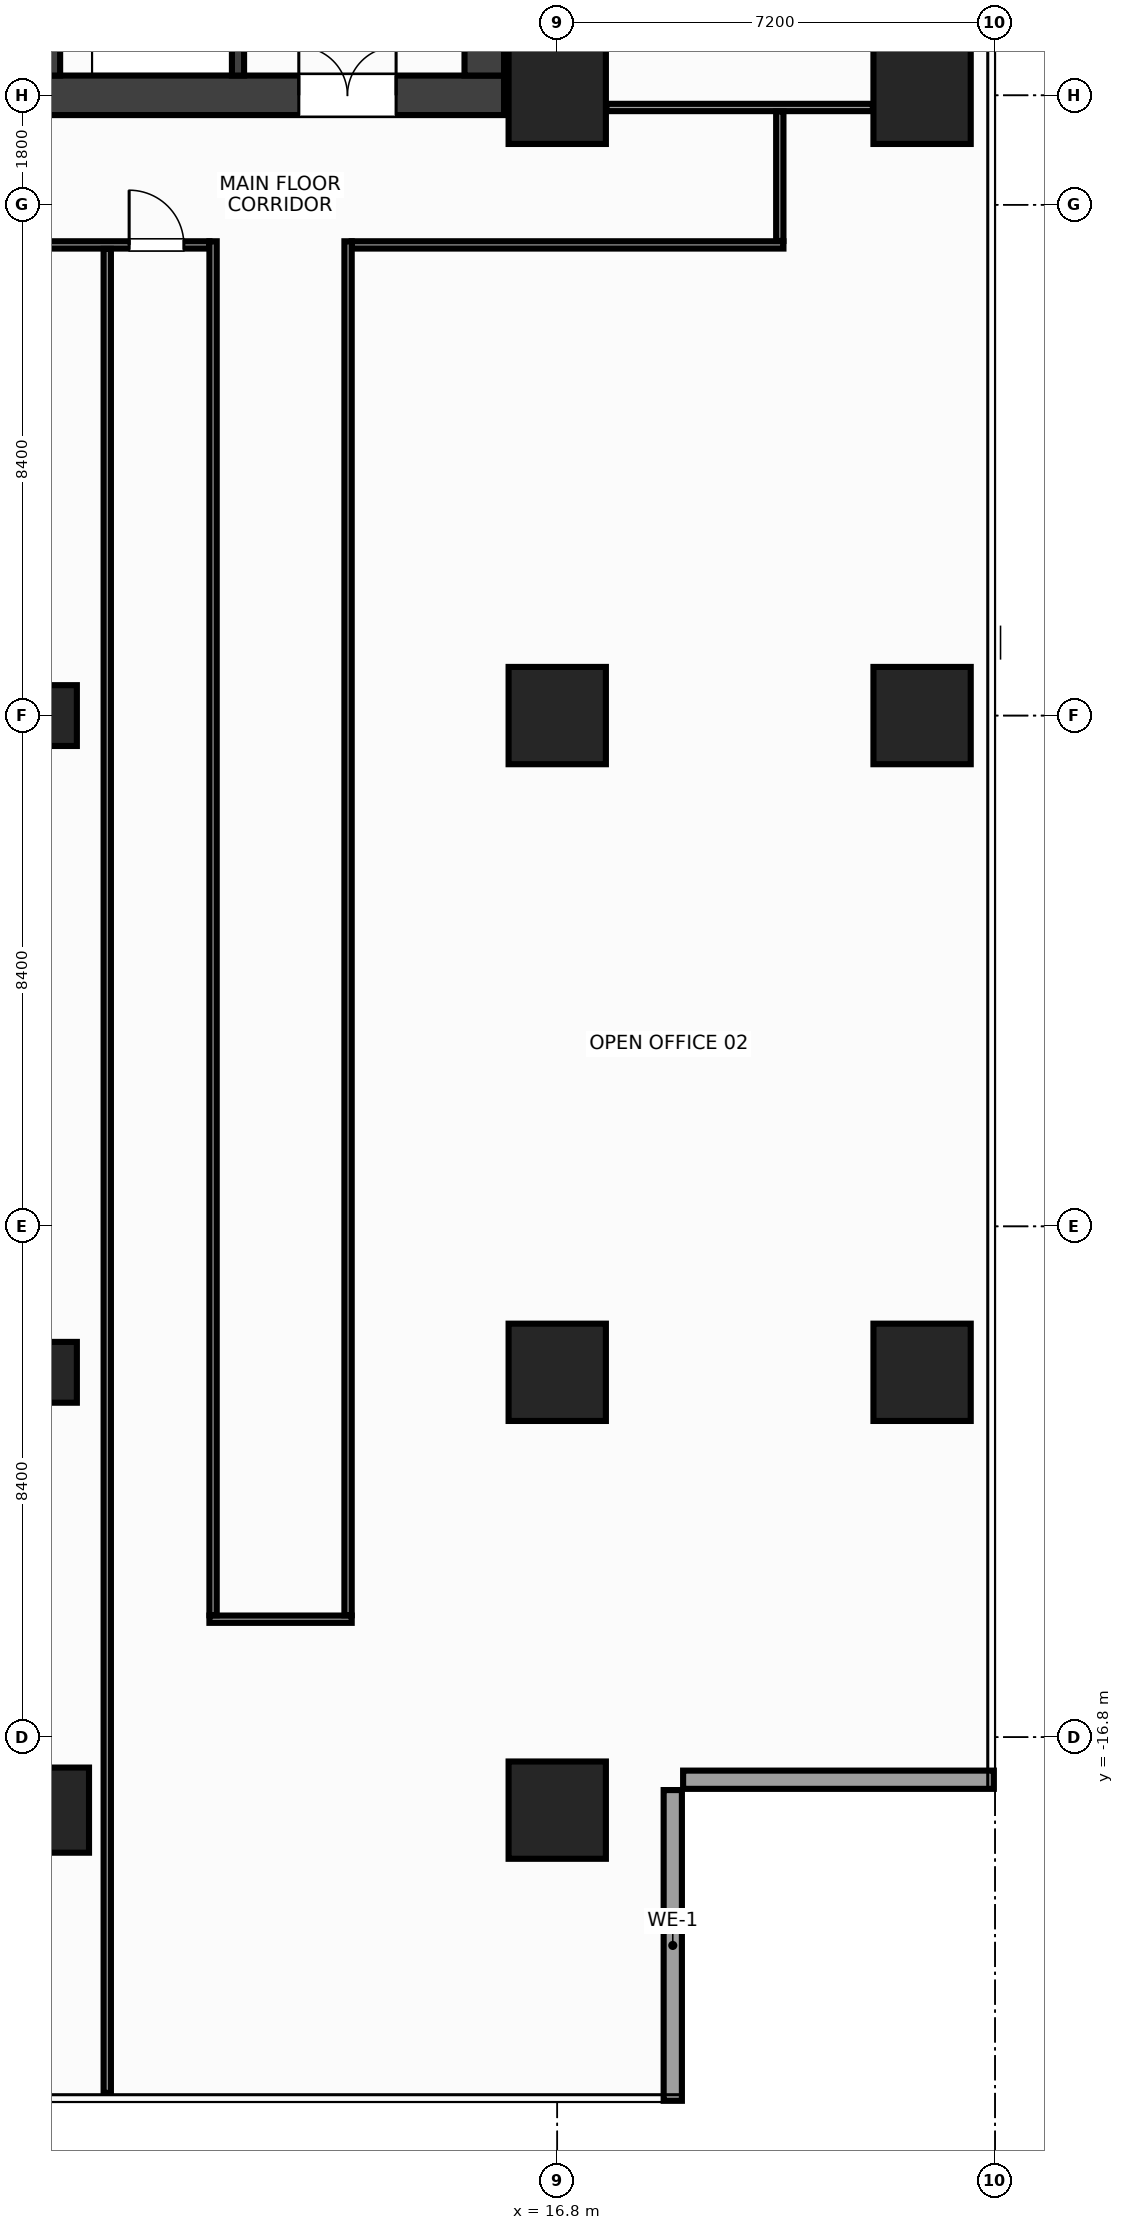
"""IFC4 building model, lengths in metres.
Left out: names, types, materials, properties, quantities, classifications, styles, units other than length and angle.
Written with IfcOpenShell. Run it as: python <this file> out.ifc"""

import sys

from ifc_helpers import new_model, si_unit, direction, frame, frame_2d, origin, origin_2d, place, context, subcontext, project, spatial, rectangle, hollow_rectangle, extrude, source, transform, mapped, element, fill, save


model = new_model("IFC4")
c1 = context("Model", 3, precision=1e-05, world=origin(), true_north=direction((0.0, 1.0)))
c2 = subcontext(c1, "Body", "Model", "MODEL_VIEW")
j1 = project(units=[si_unit("LENGTHUNIT", "METRE"), si_unit("PLANEANGLEUNIT", "RADIAN")], contexts=[c1])
p1 = place(None, origin())
s1 = spatial("IfcSite", under=j1, at=p1, CompositionType="ELEMENT")
p2 = place(p1, origin())
s2 = spatial("IfcBuilding", under=s1, at=p2, CompositionType="ELEMENT")
p3 = place(p2, frame((0.0, 0.0, 142.4)))
s3 = spatial("IfcBuildingStorey", under=s2, at=p3, CompositionType="ELEMENT", Elevation=142.4)
m1 = source(origin(), c2, "Body", "SweptSolid", [
    extrude(rectangle(XDim=31.85, YDim=0.65, at=frame_2d((15.925, 0.0))), origin(), (0.0, 0.0, 1.0), 3.6),
])
p4 = place(p3, frame((-15.925, 10.2, 0.0), z_axis=(0.0, 0.0, 1.0), x_axis=(1.0, 0.0, 0.0)))
e1 = element("IfcWall", 1, at=p4, inside=s3, PredefinedType="SHEAR", context=c2, shape_type="MappedRepresentation", body=[
    mapped(m1, transform((0.0, 0.0, 0.0), x_axis=(1.0, 0.0, 0.0), y_axis=(0.0, 1.0, 0.0), z_axis=(0.0, 0.0, 1.0), scale=1.0)),
])
p5 = place(p4, frame((1.775, 0.0, 0.0)))
e2 = element("IfcOpeningElement", 2, at=p5, cuts=e1, PredefinedType="OPENING", context=c2, shape_type="SweptSolid", body=[
    extrude(rectangle(XDim=1.6, YDim=2.15, at=frame_2d((0.8, 1.075))), frame((0.0, 0.337, 0.0), z_axis=(0.0, -1.0, 0.0), x_axis=(1.0, 0.0, 0.0)), (0.0, 0.0, 1.0), 0.674),
])
p6 = place(p4, frame((28.475, 0.0, 0.0)))
e3 = element("IfcOpeningElement", 3, at=p6, cuts=e1, PredefinedType="OPENING", context=c2, shape_type="SweptSolid", body=[
    extrude(rectangle(XDim=1.6, YDim=2.15, at=frame_2d((0.8, 1.075))), frame((0.0, 0.337, 0.0), z_axis=(0.0, -1.0, 0.0), x_axis=(1.0, 0.0, 0.0)), (0.0, 0.0, 1.0), 0.674),
])
p7 = place(p4, frame((15.175, 0.0, 0.0)))
e4 = element("IfcOpeningElement", 4, at=p7, cuts=e1, PredefinedType="OPENING", context=c2, shape_type="SweptSolid", body=[
    extrude(rectangle(XDim=1.5, YDim=2.2, at=frame_2d((0.75, 1.1))), frame((0.0, 0.337, 0.0), z_axis=(0.0, -1.0, 0.0), x_axis=(1.0, 0.0, 0.0)), (0.0, 0.0, 1.0), 0.674),
])
m2 = source(origin(), c2, "Body", "SweptSolid", [
    extrude(rectangle(XDim=12.95, YDim=0.65, at=frame_2d((6.475, 0.0))), origin(), (0.0, 0.0, 1.0), 3.6),
])
p8 = place(p3, frame((15.6, 10.525, 0.0), z_axis=(0.0, 0.0, 1.0), x_axis=(0.0, 1.0, 0.0)))
e5 = element("IfcWall", 5, at=p8, inside=s3, PredefinedType="SHEAR", context=c2, shape_type="MappedRepresentation", body=[
    mapped(m2, transform((0.0, 0.0, 0.0), x_axis=(1.0, 0.0, 0.0), y_axis=(0.0, 1.0, 0.0), z_axis=(0.0, 0.0, 1.0), scale=1.0)),
])
m3 = source(origin(), c2, "Body", "SweptSolid", [
    extrude(rectangle(XDim=12.95, YDim=0.25, at=frame_2d((6.475, 0.0))), origin(), (0.0, 0.0, 1.0), 3.6),
])
p9 = place(p3, frame((8.5, 10.525, 0.0), z_axis=(0.0, 0.0, 1.0), x_axis=(0.0, 1.0, 0.0)))
e6 = element("IfcWall", 6, at=p9, inside=s3, PredefinedType="SHEAR", context=c2, shape_type="MappedRepresentation", body=[
    mapped(m3, transform((0.0, 0.0, 0.0), x_axis=(1.0, 0.0, 0.0), y_axis=(0.0, 1.0, 0.0), z_axis=(0.0, 0.0, 1.0), scale=1.0)),
])
p10 = place(p9, frame((9.925, 0.0, 0.0)))
e7 = element("IfcOpeningElement", 7, at=p10, cuts=e6, PredefinedType="OPENING", context=c2, shape_type="SweptSolid", body=[
    extrude(rectangle(XDim=0.95, YDim=2.15, at=frame_2d((0.475, 1.075))), frame((0.0, 0.137, 0.0), z_axis=(0.0, -1.0, 0.0), x_axis=(1.0, 0.0, 0.0)), (0.0, 0.0, 1.0), 0.274),
])
m4 = source(origin(), c2, "Body", "SweptSolid", [
    extrude(rectangle(XDim=3.125, YDim=0.2, at=frame_2d((1.562, 0.0))), origin(), (0.0, 0.0, 1.0), 3.6),
])
p11 = place(p3, frame((11.55, 10.525, 0.0), z_axis=(0.0, 0.0, 1.0), x_axis=(0.0, 1.0, 0.0)))
e8 = element("IfcWall", 8, at=p11, inside=s3, PredefinedType="SHEAR", context=c2, shape_type="MappedRepresentation", body=[
    mapped(m4, transform((0.0, 0.0, 0.0), x_axis=(1.0, 0.0, 0.0), y_axis=(0.0, 1.0, 0.0), z_axis=(0.0, 0.0, 1.0), scale=1.0)),
])
p12 = place(p11, frame((0.9, 0.0, 0.0)))
e9 = element("IfcOpeningElement", 9, at=p12, cuts=e8, PredefinedType="OPENING", context=c2, shape_type="SweptSolid", body=[
    extrude(rectangle(XDim=1.1, YDim=2.15, at=frame_2d((0.55, 1.075))), frame((0.0, 0.112, 0.0), z_axis=(0.0, -1.0, 0.0), x_axis=(1.0, 0.0, 0.0)), (0.0, 0.0, 1.0), 0.224),
])
m5 = source(origin(), c2, "Body", "SweptSolid", [
    extrude(rectangle(XDim=1.6, YDim=1.6, at=origin_2d()), origin(), (0.0, 0.0, 1.0), 3.6),
])
for number, where, z_axis, x_axis in (
    (10, (16.8, -18.0, 0.0), (0.0, 0.0, 1.0), (1.0, 0.0, 0.0)),
    (11, (16.8, -10.8, 0.0), (0.0, 0.0, 1.0), (1.0, 0.0, 0.0)),
    (12, (16.8, 0.0, 0.0), (0.0, 0.0, 1.0), (1.0, 0.0, 0.0)),
    (13, (16.8, 10.2, 0.0), (0.0, 0.0, 1.0), (1.0, 0.0, 0.0)),
    (14, (22.8, -10.8, 0.0), (0.0, 0.0, 1.0), (1.0, 0.0, 0.0)),
    (15, (22.8, 0.0, 0.0), (0.0, 0.0, 1.0), (1.0, 0.0, 0.0)),
    (16, (22.8, 10.2, 0.0), (0.0, 0.0, 1.0), (1.0, 0.0, 0.0)),
):
    element("IfcColumn", number, at=place(p3, frame(where, z_axis=z_axis, x_axis=x_axis)), inside=s3, PredefinedType="COLUMN", context=c2, shape_type="MappedRepresentation", body=[
        mapped(m5, transform((0.0, 0.0, 0.0), x_axis=(1.0, 0.0, 0.0), y_axis=(0.0, 1.0, 0.0), z_axis=(0.0, 0.0, 1.0), scale=1.0)),
    ])
m6 = source(origin(), c2, "Body", "SweptSolid", [
    extrude(rectangle(XDim=1.4, YDim=1.4, at=origin_2d()), origin(), (0.0, 0.0, 1.0), 3.6),
])
p13 = place(p3, frame((8.4, -18.0, 0.0), z_axis=(0.0, 0.0, 1.0), x_axis=(1.0, 0.0, 0.0)))
e17 = element("IfcColumn", 17, at=p13, inside=s3, PredefinedType="COLUMN", context=c2, shape_type="MappedRepresentation", body=[
    mapped(m6, transform((0.0, 0.0, 0.0), x_axis=(1.0, 0.0, 0.0), y_axis=(0.0, 1.0, 0.0), z_axis=(0.0, 0.0, 1.0), scale=1.0)),
])
m7 = source(origin(), c2, "Body", "SweptSolid", [
    extrude(hollow_rectangle(XDim=1.0, YDim=1.0, WallThickness=0.045, at=origin_2d()), origin(), (0.0, 0.0, 1.0), 3.6),
])
for number, where, z_axis, x_axis in (
    (18, (8.4, 0.0, 0.0), (0.0, 0.0, 1.0), (1.0, 0.0, 0.0)),
    (19, (8.4, -10.8, 0.0), (0.0, 0.0, 1.0), (1.0, 0.0, 0.0)),
):
    element("IfcColumn", number, at=place(p3, frame(where, z_axis=z_axis, x_axis=x_axis)), inside=s3, PredefinedType="COLUMN", context=c2, shape_type="MappedRepresentation", body=[
        mapped(m7, transform((0.0, 0.0, 0.0), x_axis=(1.0, 0.0, 0.0), y_axis=(0.0, 1.0, 0.0), z_axis=(0.0, 0.0, 1.0), scale=1.0)),
    ])
m8 = source(origin(), c2, "Body", "SweptSolid", [
    extrude(rectangle(XDim=5.11, YDim=0.3, at=frame_2d((2.555, 0.0))), origin(), (0.0, 0.0, 1.0), 2.76),
])
p14 = place(p3, frame((18.7, -22.78, 0.0), z_axis=(0.0, 0.0, 1.0), x_axis=(0.0, 1.0, 0.0)))
e20 = element("IfcWall", 20, at=p14, inside=s3, PredefinedType="STANDARD", context=c2, shape_type="MappedRepresentation", body=[
    mapped(m8, transform((0.0, 0.0, 0.0), x_axis=(1.0, 0.0, 0.0), y_axis=(0.0, 1.0, 0.0), z_axis=(0.0, 0.0, 1.0), scale=1.0)),
])
m9 = source(origin(), c2, "Body", "SweptSolid", [
    extrude(rectangle(XDim=5.11, YDim=0.3, at=frame_2d((2.555, 0.0))), origin(), (0.0, 0.0, 1.0), 2.76),
])
p15 = place(p3, frame((18.87, -17.5, 0.0), z_axis=(0.0, 0.0, 1.0), x_axis=(1.0, 0.0, 0.0)))
e21 = element("IfcWall", 21, at=p15, inside=s3, PredefinedType="STANDARD", context=c2, shape_type="MappedRepresentation", body=[
    mapped(m9, transform((0.0, 0.0, 0.0), x_axis=(1.0, 0.0, 0.0), y_axis=(0.0, 1.0, 0.0), z_axis=(0.0, 0.0, 1.0), scale=1.0)),
])
m10 = source(origin(), c2, "Body", "SweptSolid", [
    extrude(rectangle(XDim=4.38, YDim=0.12, at=frame_2d((2.19, 0.0))), origin(), (0.0, 0.0, 1.0), 2.915),
])
p16 = place(p3, frame((17.61, 10.0, 0.0), z_axis=(0.0, 0.0, 1.0), x_axis=(1.0, 0.0, 0.0)))
e22 = element("IfcWall", 22, at=p16, inside=s3, PredefinedType="PARTITIONING", context=c2, shape_type="MappedRepresentation", body=[
    mapped(m10, transform((0.0, 0.0, 0.0), x_axis=(1.0, 0.0, 0.0), y_axis=(0.0, 1.0, 0.0), z_axis=(0.0, 0.0, 1.0), scale=1.0)),
])
m11 = source(origin(), c2, "Body", "SweptSolid", [
    extrude(rectangle(XDim=31.6, YDim=0.12, at=frame_2d((15.8, 0.0))), origin(), (0.0, 0.0, 1.0), 2.765),
])
p17 = place(p3, frame((-20.52, 7.74, 0.0), z_axis=(0.0, 0.0, 1.0), x_axis=(1.0, 0.0, 0.0)))
e23 = element("IfcWall", 23, at=p17, inside=s3, PredefinedType="PARTITIONING", context=c2, shape_type="MappedRepresentation", body=[
    mapped(m11, transform((0.0, 0.0, 0.0), x_axis=(1.0, 0.0, 0.0), y_axis=(0.0, 1.0, 0.0), z_axis=(0.0, 0.0, 1.0), scale=1.0)),
])
p18 = place(p17, frame((1.74, 0.0, 0.0)))
e24 = element("IfcOpeningElement", 24, at=p18, cuts=e23, PredefinedType="OPENING", context=c2, shape_type="SweptSolid", body=[
    extrude(rectangle(XDim=0.9, YDim=2.15, at=frame_2d((0.45, 1.075))), frame((0.0, 0.072, 0.0), z_axis=(0.0, -1.0, 0.0), x_axis=(1.0, 0.0, 0.0)), (0.0, 0.0, 1.0), 0.144),
])
p19 = place(p17, frame((30.28, 0.0, 0.0)))
e25 = element("IfcOpeningElement", 25, at=p19, cuts=e23, PredefinedType="OPENING", context=c2, shape_type="SweptSolid", body=[
    extrude(rectangle(XDim=0.9, YDim=2.15, at=frame_2d((0.45, 1.075))), frame((0.0, 0.072, 0.0), z_axis=(0.0, -1.0, 0.0), x_axis=(1.0, 0.0, 0.0)), (0.0, 0.0, 1.0), 0.144),
])
p20 = place(p17, frame((10.67, 0.0, 0.0)))
e26 = element("IfcOpeningElement", 26, at=p20, cuts=e23, PredefinedType="OPENING", context=c2, shape_type="SweptSolid", body=[
    extrude(rectangle(XDim=0.9, YDim=2.15, at=frame_2d((0.45, 1.075))), frame((0.0, 0.072, 0.0), z_axis=(0.0, -1.0, 0.0), x_axis=(1.0, 0.0, 0.0)), (0.0, 0.0, 1.0), 0.144),
])
p21 = place(p17, frame((23.47, 0.0, 0.0)))
e27 = element("IfcOpeningElement", 27, at=p21, cuts=e23, PredefinedType="OPENING", context=c2, shape_type="SweptSolid", body=[
    extrude(rectangle(XDim=0.9, YDim=2.15, at=frame_2d((0.45, 1.075))), frame((0.0, 0.072, 0.0), z_axis=(0.0, -1.0, 0.0), x_axis=(1.0, 0.0, 0.0)), (0.0, 0.0, 1.0), 0.144),
])
m12 = source(origin(), c2, "Body", "SweptSolid", [
    extrude(rectangle(XDim=7.1, YDim=0.12, at=frame_2d((3.55, 0.0))), origin(), (0.0, 0.0, 1.0), 2.765),
])
p22 = place(p3, frame((13.42, 7.74, 0.0), z_axis=(0.0, 0.0, 1.0), x_axis=(1.0, 0.0, 0.0)))
e28 = element("IfcWall", 28, at=p22, inside=s3, PredefinedType="PARTITIONING", context=c2, shape_type="MappedRepresentation", body=[
    mapped(m12, transform((0.0, 0.0, 0.0), x_axis=(1.0, 0.0, 0.0), y_axis=(0.0, 1.0, 0.0), z_axis=(0.0, 0.0, 1.0), scale=1.0)),
])
m13 = source(origin(), c2, "Body", "SweptSolid", [
    extrude(rectangle(XDim=2.34, YDim=0.12, at=frame_2d((1.17, 0.0))), origin(), (0.0, 0.0, 1.0), 3.38),
])
p23 = place(p3, frame((11.08, -14.86, 0.0), z_axis=(0.0, 0.0, 1.0), x_axis=(1.0, 0.0, 0.0)))
e29 = element("IfcWall", 29, at=p23, inside=s3, PredefinedType="PARTITIONING", context=c2, shape_type="MappedRepresentation", body=[
    mapped(m13, transform((0.0, 0.0, 0.0), x_axis=(1.0, 0.0, 0.0), y_axis=(0.0, 1.0, 0.0), z_axis=(0.0, 0.0, 1.0), scale=1.0)),
])
m14 = source(origin(), c2, "Body", "SweptSolid", [
    extrude(rectangle(XDim=2.13, YDim=0.12, at=frame_2d((1.065, 0.0))), origin(), (0.0, 0.0, 1.0), 3.38),
])
p24 = place(p3, frame((20.46, 7.805, 0.0), z_axis=(0.0, 0.0, 1.0), x_axis=(0.0, 1.0, 0.0)))
e30 = element("IfcWall", 30, at=p24, inside=s3, PredefinedType="PARTITIONING", context=c2, shape_type="MappedRepresentation", body=[
    mapped(m14, transform((0.0, 0.0, 0.0), x_axis=(1.0, 0.0, 0.0), y_axis=(0.0, 1.0, 0.0), z_axis=(0.0, 0.0, 1.0), scale=1.0)),
])
m15 = source(origin(), c2, "Body", "SweptSolid", [
    extrude(rectangle(XDim=22.595, YDim=0.12, at=frame_2d((11.297, 0.0))), origin(), (0.0, 0.0, 1.0), 2.665),
])
for number, where, z_axis, x_axis in (
    (31, (11.14, -14.795, 0.0), (0.0, 0.0, 1.0), (0.0, 1.0, 0.0)),
    (32, (13.36, -14.795, 0.0), (0.0, 0.0, 1.0), (0.0, 1.0, 0.0)),
):
    element("IfcWall", number, at=place(p3, frame(where, z_axis=z_axis, x_axis=x_axis)), inside=s3, PredefinedType="PARTITIONING", context=c2, shape_type="MappedRepresentation", body=[
        mapped(m15, transform((0.0, 0.0, 0.0), x_axis=(1.0, 0.0, 0.0), y_axis=(0.0, 1.0, 0.0), z_axis=(0.0, 0.0, 1.0), scale=1.0)),
    ])
m16 = source(origin(), c2, "Body", "SweptSolid", [
    extrude(rectangle(XDim=30.325, YDim=0.12, at=frame_2d((15.163, 0.0))), origin(), (0.0, 0.0, 1.0), 2.665),
])
p25 = place(p3, frame((9.4, -22.65, 0.0), z_axis=(0.0, 0.0, 1.0), x_axis=(0.0, 1.0, 0.0)))
e33 = element("IfcWall", 33, at=p25, inside=s3, PredefinedType="PARTITIONING", context=c2, shape_type="MappedRepresentation", body=[
    mapped(m16, transform((0.0, 0.0, 0.0), x_axis=(1.0, 0.0, 0.0), y_axis=(0.0, 1.0, 0.0), z_axis=(0.0, 0.0, 1.0), scale=1.0)),
])
m17 = source(origin(), c2, "Body", "SweptSolid", [
    extrude(rectangle(XDim=1.6, YDim=2.15, at=frame_2d((0.8, 1.075))), frame((0.0, 0.025, 0.0), z_axis=(0.0, -1.0, 0.0), x_axis=(1.0, 0.0, 0.0)), (0.0, 0.0, 1.0), 0.05),
])
p26 = place(p6, origin())
e34 = element("IfcDoor", 34, at=p26, inside=s3, OperationType="DOUBLE_DOOR_SINGLE_SWING", PredefinedType="DOOR", context=c2, shape_type="MappedRepresentation", body=[
    mapped(m17, transform((0.0, 0.0, 0.0), x_axis=(1.0, 0.0, 0.0), y_axis=(0.0, 1.0, 0.0), z_axis=(0.0, 0.0, 1.0), scale=1.0)),
])
fill(e3, e34)
m18 = source(origin(), c2, "Body", "SweptSolid", [
    extrude(rectangle(XDim=0.9, YDim=2.15, at=frame_2d((0.45, 1.075))), frame((0.0, 0.025, 0.0), z_axis=(0.0, -1.0, 0.0), x_axis=(1.0, 0.0, 0.0)), (0.0, 0.0, 1.0), 0.05),
])
p27 = place(p19, origin())
e35 = element("IfcDoor", 35, at=p27, inside=s3, OperationType="SINGLE_SWING_LEFT", PredefinedType="DOOR", context=c2, shape_type="MappedRepresentation", body=[
    mapped(m18, transform((0.0, 0.0, 0.0), x_axis=(1.0, 0.0, 0.0), y_axis=(0.0, 1.0, 0.0), z_axis=(0.0, 0.0, 1.0), scale=1.0)),
])
fill(e25, e35)
save(model, sys.argv[1])
